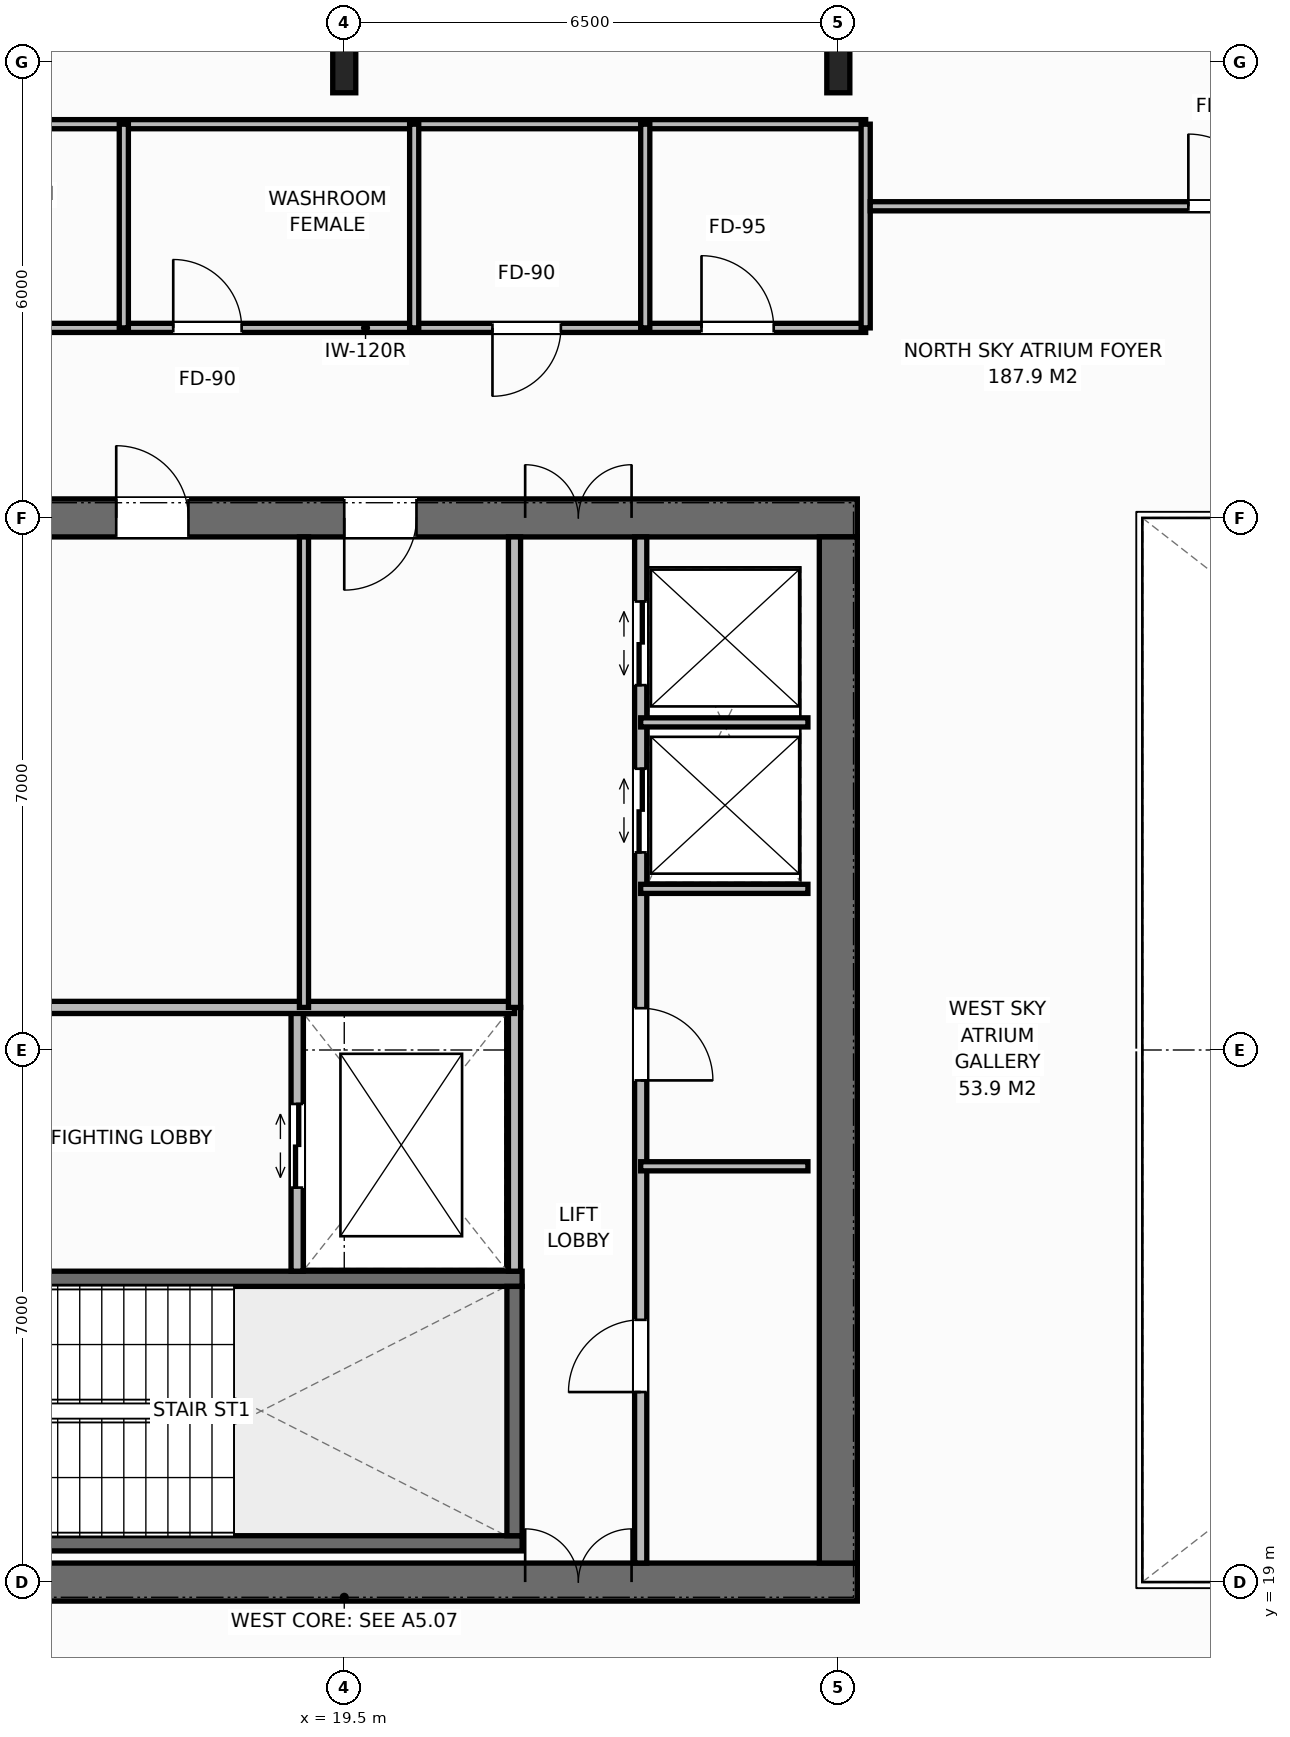
"""IFC4 building model, lengths in metres.
Left out: names, types, materials, properties, quantities, classifications, styles, units other than length and angle.
Written with IfcOpenShell. Run it as: python <this file> out.ifc"""

import sys

from ifc_helpers import new_model, si_unit, direction, frame, frame_2d, origin, origin_2d, place, context, subcontext, project, spatial, rectangle, i_section, extrude, element, fill, save


model = new_model("IFC4")
c1 = context("Model", 3, precision=1e-05, world=origin(), true_north=direction((0.0, 1.0)))
c2 = subcontext(c1, "Body", "Model", "MODEL_VIEW")
j1 = project(units=[si_unit("LENGTHUNIT", "METRE"), si_unit("PLANEANGLEUNIT", "RADIAN")], contexts=[c1])
p1 = place(None, origin())
s1 = spatial("IfcSite", under=j1, at=p1, CompositionType="ELEMENT")
p2 = place(p1, origin())
s2 = spatial("IfcBuilding", under=s1, at=p2, CompositionType="ELEMENT")
p3 = place(p2, frame((0.0, 0.0, 255.6)))
s3 = spatial("IfcBuildingStorey", under=s2, at=p3, CompositionType="ELEMENT", Elevation=255.6)
p4 = place(p3, frame((12.75, 19.0, 0.0), z_axis=(0.0, 0.0, 1.0), x_axis=(1.0, 0.0, 0.0)))
e1 = element("IfcWall", 1, at=p4, inside=s3, PredefinedType="SHEAR", context=c2, shape_type="SweptSolid", body=[
    extrude(rectangle(XDim=13.5, YDim=0.5, at=frame_2d((6.75, 0.0))), origin(), (0.0, 0.0, 1.0), 3.8),
])
p5 = place(p4, frame((9.13, 0.0, 0.0)))
e2 = element("IfcOpeningElement", 2, at=p5, cuts=e1, PredefinedType="OPENING", context=c2, shape_type="SweptSolid", body=[
    extrude(rectangle(XDim=1.4, YDim=2.2, at=frame_2d((0.7, 1.1))), frame((0.0, 0.26, 0.0), z_axis=(0.0, -1.0, 0.0), x_axis=(1.0, 0.0, 0.0)), (0.0, 0.0, 1.0), 0.52),
])
p6 = place(p3, frame((12.75, 33.0, 0.0), z_axis=(0.0, 0.0, 1.0), x_axis=(1.0, 0.0, 0.0)))
e3 = element("IfcWall", 3, at=p6, inside=s3, PredefinedType="SHEAR", context=c2, shape_type="SweptSolid", body=[
    extrude(rectangle(XDim=13.5, YDim=0.5, at=frame_2d((6.75, 0.0))), origin(), (0.0, 0.0, 1.0), 3.8),
])
p7 = place(p6, frame((1.15, 0.0, 0.0)))
e4 = element("IfcOpeningElement", 4, at=p7, cuts=e3, PredefinedType="OPENING", context=c2, shape_type="SweptSolid", body=[
    extrude(rectangle(XDim=0.9, YDim=2.15, at=frame_2d((0.45, 1.075))), frame((0.0, 0.26, 0.0), z_axis=(0.0, -1.0, 0.0), x_axis=(1.0, 0.0, 0.0)), (0.0, 0.0, 1.0), 0.52),
])
p8 = place(p6, frame((3.75, 0.0, 0.0)))
e5 = element("IfcOpeningElement", 5, at=p8, cuts=e3, PredefinedType="OPENING", context=c2, shape_type="SweptSolid", body=[
    extrude(rectangle(XDim=0.95, YDim=2.15, at=frame_2d((0.475, 1.075))), frame((0.0, 0.26, 0.0), z_axis=(0.0, -1.0, 0.0), x_axis=(1.0, 0.0, 0.0)), (0.0, 0.0, 1.0), 0.52),
])
p9 = place(p6, frame((6.75, 0.0, 0.0)))
e6 = element("IfcOpeningElement", 6, at=p9, cuts=e3, PredefinedType="OPENING", context=c2, shape_type="SweptSolid", body=[
    extrude(rectangle(XDim=0.95, YDim=2.15, at=frame_2d((0.475, 1.075))), frame((0.0, 0.26, 0.0), z_axis=(0.0, -1.0, 0.0), x_axis=(1.0, 0.0, 0.0)), (0.0, 0.0, 1.0), 0.52),
])
p10 = place(p6, frame((9.13, 0.0, 0.0)))
e7 = element("IfcOpeningElement", 7, at=p10, cuts=e3, PredefinedType="OPENING", context=c2, shape_type="SweptSolid", body=[
    extrude(rectangle(XDim=1.4, YDim=2.2, at=frame_2d((0.7, 1.1))), frame((0.0, 0.26, 0.0), z_axis=(0.0, -1.0, 0.0), x_axis=(1.0, 0.0, 0.0)), (0.0, 0.0, 1.0), 0.52),
])
p11 = place(p3, frame((26.0, 19.25, 0.0), z_axis=(0.0, 0.0, 1.0), x_axis=(0.0, 1.0, 0.0)))
e8 = element("IfcWall", 8, at=p11, inside=s3, PredefinedType="SHEAR", context=c2, shape_type="SweptSolid", body=[
    extrude(rectangle(XDim=13.5, YDim=0.5, at=frame_2d((6.75, 0.0))), origin(), (0.0, 0.0, 1.0), 3.8),
])
p12 = place(p3, frame((13.41, 19.51, 0.0), z_axis=(0.0, 0.0, 1.0), x_axis=(1.0, 0.0, 0.0)))
e9 = element("IfcWall", 9, at=p12, inside=s3, PredefinedType="SHEAR", context=c2, shape_type="SweptSolid", body=[
    extrude(rectangle(XDim=8.43, YDim=0.2, at=frame_2d((4.215, 0.0))), origin(), (0.0, 0.0, 1.0), 3.8),
])
p13 = place(p3, frame((13.41, 22.99, 0.0), z_axis=(0.0, 0.0, 1.0), x_axis=(1.0, 0.0, 0.0)))
e10 = element("IfcWall", 10, at=p13, inside=s3, PredefinedType="SHEAR", context=c2, shape_type="SweptSolid", body=[
    extrude(rectangle(XDim=8.43, YDim=0.2, at=frame_2d((4.215, 0.0))), origin(), (0.0, 0.0, 1.0), 3.8),
])
p14 = place(p13, frame((0.45, 0.0, 0.0)))
e11 = element("IfcOpeningElement", 11, at=p14, cuts=e10, PredefinedType="OPENING", context=c2, shape_type="SweptSolid", body=[
    extrude(rectangle(XDim=1.0, YDim=2.15, at=frame_2d((0.5, 1.075))), frame((0.0, 0.11, 0.0), z_axis=(0.0, -1.0, 0.0), x_axis=(1.0, 0.0, 0.0)), (0.0, 0.0, 1.0), 0.22),
])
p15 = place(p3, frame((21.74, 19.61, 0.0), z_axis=(0.0, 0.0, 1.0), x_axis=(0.0, 1.0, 0.0)))
e12 = element("IfcWall", 12, at=p15, inside=s3, PredefinedType="SHEAR", context=c2, shape_type="SweptSolid", body=[
    extrude(rectangle(XDim=3.28, YDim=0.2, at=frame_2d((1.64, 0.0))), origin(), (0.0, 0.0, 1.0), 3.8),
])
for number, where, z_axis, x_axis in (
    (13, (19.5, 39.0, 0.0), (0.0, 0.0, 1.0), (1.0, 0.0, 0.0)),
    (14, (26.0, 39.0, 0.0), (0.0, 0.0, 1.0), (1.0, 0.0, 0.0)),
):
    element("IfcColumn", number, at=place(p3, frame(where, z_axis=z_axis, x_axis=x_axis)), inside=s3, PredefinedType="COLUMN", context=c2, shape_type="SweptSolid", body=[
        extrude(i_section(OverallWidth=0.303, OverallDepth=0.814, WebThickness=0.021, FlangeThickness=0.04, at=origin_2d()), origin(), (0.0, 0.0, 1.0), 3.8),
    ])
p16 = place(p3, frame((21.74, 23.09, 0.0), z_axis=(0.0, 0.0, 1.0), x_axis=(0.0, 1.0, 0.0)))
e15 = element("IfcWall", 15, at=p16, inside=s3, PredefinedType="STANDARD", context=c2, shape_type="SweptSolid", body=[
    extrude(rectangle(XDim=3.47, YDim=0.16, at=frame_2d((1.735, 0.0))), origin(), (0.0, 0.0, 1.0), 3.588),
])
p17 = place(p3, frame((18.88, 23.09, 0.0), z_axis=(0.0, 0.0, 1.0), x_axis=(0.0, 1.0, 0.0)))
e16 = element("IfcWall", 16, at=p17, inside=s3, PredefinedType="STANDARD", context=c2, shape_type="SweptSolid", body=[
    extrude(rectangle(XDim=3.47, YDim=0.16, at=frame_2d((1.735, 0.0))), origin(), (0.0, 0.0, 1.0), 3.588),
])
p18 = place(p17, frame((1.1, 0.0, 0.0)))
e17 = element("IfcOpeningElement", 17, at=p18, cuts=e16, PredefinedType="OPENING", context=c2, shape_type="SweptSolid", body=[
    extrude(rectangle(XDim=1.1, YDim=2.2, at=frame_2d((0.55, 1.1))), frame((0.0, 0.09, 0.0), z_axis=(0.0, -1.0, 0.0), x_axis=(1.0, 0.0, 0.0)), (0.0, 0.0, 1.0), 0.18),
])
p19 = place(p3, frame((13.4, 26.56, 0.0), z_axis=(0.0, 0.0, 1.0), x_axis=(1.0, 0.0, 0.0)))
e18 = element("IfcWall", 18, at=p19, inside=s3, PredefinedType="STANDARD", context=c2, shape_type="SweptSolid", body=[
    extrude(rectangle(XDim=8.34, YDim=0.16, at=frame_2d((4.17, 0.0))), origin(), (0.0, 0.0, 1.0), 3.588),
])
p20 = place(p3, frame((18.97, 26.56, 0.0), z_axis=(0.0, 0.0, 1.0), x_axis=(0.0, 1.0, 0.0)))
e19 = element("IfcWall", 19, at=p20, inside=s3, PredefinedType="PARTITIONING", context=c2, shape_type="SweptSolid", body=[
    extrude(rectangle(XDim=6.19, YDim=0.12, at=frame_2d((3.095, 0.0))), origin(), (0.0, 0.0, 1.0), 3.588),
])
p21 = place(p3, frame((21.74, 26.56, 0.0), z_axis=(0.0, 0.0, 1.0), x_axis=(0.0, 1.0, 0.0)))
e20 = element("IfcWall", 20, at=p21, inside=s3, PredefinedType="STANDARD", context=c2, shape_type="SweptSolid", body=[
    extrude(rectangle(XDim=6.19, YDim=0.16, at=frame_2d((3.095, 0.0))), origin(), (0.0, 0.0, 1.0), 3.588),
])
p22 = place(p3, frame((23.4, 19.25, 0.0), z_axis=(0.0, 0.0, 1.0), x_axis=(0.0, 1.0, 0.0)))
e21 = element("IfcWall", 21, at=p22, inside=s3, PredefinedType="STANDARD", context=c2, shape_type="SweptSolid", body=[
    extrude(rectangle(XDim=13.5, YDim=0.16, at=frame_2d((6.75, 0.0))), origin(), (0.0, 0.0, 1.0), 3.588),
])
p23 = place(p22, frame((2.25, 0.0, 0.0)))
e22 = element("IfcOpeningElement", 22, at=p23, cuts=e21, PredefinedType="OPENING", context=c2, shape_type="SweptSolid", body=[
    extrude(rectangle(XDim=0.95, YDim=2.15, at=frame_2d((0.475, 1.075))), frame((0.0, 0.09, 0.0), z_axis=(0.0, -1.0, 0.0), x_axis=(1.0, 0.0, 0.0)), (0.0, 0.0, 1.0), 0.18),
])
p24 = place(p22, frame((6.35, 0.0, 0.0)))
e23 = element("IfcOpeningElement", 23, at=p24, cuts=e21, PredefinedType="OPENING", context=c2, shape_type="SweptSolid", body=[
    extrude(rectangle(XDim=0.95, YDim=2.15, at=frame_2d((0.475, 1.075))), frame((0.0, 0.09, 0.0), z_axis=(0.0, -1.0, 0.0), x_axis=(1.0, 0.0, 0.0)), (0.0, 0.0, 1.0), 0.18),
])
p25 = place(p22, frame((9.35, 0.0, 0.0)))
e24 = element("IfcOpeningElement", 24, at=p25, cuts=e21, PredefinedType="OPENING", context=c2, shape_type="SweptSolid", body=[
    extrude(rectangle(XDim=1.1, YDim=2.2, at=frame_2d((0.55, 1.1))), frame((0.0, 0.09, 0.0), z_axis=(0.0, -1.0, 0.0), x_axis=(1.0, 0.0, 0.0)), (0.0, 0.0, 1.0), 0.18),
])
p26 = place(p22, frame((11.55, 0.0, 0.0)))
e25 = element("IfcOpeningElement", 25, at=p26, cuts=e21, PredefinedType="OPENING", context=c2, shape_type="SweptSolid", body=[
    extrude(rectangle(XDim=1.1, YDim=2.2, at=frame_2d((0.55, 1.1))), frame((0.0, 0.09, 0.0), z_axis=(0.0, -1.0, 0.0), x_axis=(1.0, 0.0, 0.0)), (0.0, 0.0, 1.0), 0.18),
])
for number, where, z_axis, x_axis in (
    (26, (23.4, 24.47, 0.0), (0.0, 0.0, 1.0), (1.0, 0.0, 0.0)),
    (27, (23.4, 28.12, 0.0), (0.0, 0.0, 1.0), (1.0, 0.0, 0.0)),
    (28, (23.4, 30.31, 0.0), (0.0, 0.0, 1.0), (1.0, 0.0, 0.0)),
):
    element("IfcWall", number, at=place(p3, frame(where, z_axis=z_axis, x_axis=x_axis)), inside=s3, PredefinedType="PARTITIONING", context=c2, shape_type="SweptSolid", body=[
        extrude(rectangle(XDim=2.2, YDim=0.12, at=frame_2d((1.1, 0.0))), origin(), (0.0, 0.0, 1.0), 3.588),
    ])
p27 = place(p3, frame((13.2, 35.5, 0.0), z_axis=(0.0, 0.0, 1.0), x_axis=(1.0, 0.0, 0.0)))
e29 = element("IfcWall", 29, at=p27, inside=s3, PredefinedType="PARTITIONING", context=c2, shape_type="SweptSolid", body=[
    extrude(rectangle(XDim=13.16, YDim=0.12, at=frame_2d((6.58, 0.0))), origin(), (0.0, 0.0, 1.0), 3.588),
])
p28 = place(p27, frame((1.35, 0.0, 0.0)))
e30 = element("IfcOpeningElement", 30, at=p28, cuts=e29, PredefinedType="OPENING", context=c2, shape_type="SweptSolid", body=[
    extrude(rectangle(XDim=0.9, YDim=2.15, at=frame_2d((0.45, 1.075))), frame((0.0, 0.07, 0.0), z_axis=(0.0, -1.0, 0.0), x_axis=(1.0, 0.0, 0.0)), (0.0, 0.0, 1.0), 0.14),
])
p29 = place(p27, frame((4.05, 0.0, 0.0)))
e31 = element("IfcOpeningElement", 31, at=p29, cuts=e29, PredefinedType="OPENING", context=c2, shape_type="SweptSolid", body=[
    extrude(rectangle(XDim=0.9, YDim=2.15, at=frame_2d((0.45, 1.075))), frame((0.0, 0.07, 0.0), z_axis=(0.0, -1.0, 0.0), x_axis=(1.0, 0.0, 0.0)), (0.0, 0.0, 1.0), 0.14),
])
p30 = place(p27, frame((8.25, 0.0, 0.0)))
e32 = element("IfcOpeningElement", 32, at=p30, cuts=e29, PredefinedType="OPENING", context=c2, shape_type="SweptSolid", body=[
    extrude(rectangle(XDim=0.9, YDim=2.15, at=frame_2d((0.45, 1.075))), frame((0.0, 0.07, 0.0), z_axis=(0.0, -1.0, 0.0), x_axis=(1.0, 0.0, 0.0)), (0.0, 0.0, 1.0), 0.14),
])
p31 = place(p27, frame((11.0, 0.0, 0.0)))
e33 = element("IfcOpeningElement", 33, at=p31, cuts=e29, PredefinedType="OPENING", context=c2, shape_type="SweptSolid", body=[
    extrude(rectangle(XDim=0.95, YDim=2.15, at=frame_2d((0.475, 1.075))), frame((0.0, 0.07, 0.0), z_axis=(0.0, -1.0, 0.0), x_axis=(1.0, 0.0, 0.0)), (0.0, 0.0, 1.0), 0.14),
])
p32 = place(p3, frame((13.2, 38.18, 0.0), z_axis=(0.0, 0.0, 1.0), x_axis=(1.0, 0.0, 0.0)))
e34 = element("IfcWall", 34, at=p32, inside=s3, PredefinedType="PARTITIONING", context=c2, shape_type="SweptSolid", body=[
    extrude(rectangle(XDim=13.16, YDim=0.12, at=frame_2d((6.58, 0.0))), origin(), (0.0, 0.0, 1.0), 3.588),
])
for number, where, z_axis, x_axis in (
    (35, (16.6, 35.5, 0.0), (0.0, 0.0, 1.0), (0.0, 1.0, 0.0)),
    (36, (20.42, 35.5, 0.0), (0.0, 0.0, 1.0), (0.0, 1.0, 0.0)),
    (37, (23.46, 35.5, 0.0), (0.0, 0.0, 1.0), (0.0, 1.0, 0.0)),
    (38, (26.36, 35.5, 0.0), (0.0, 0.0, 1.0), (0.0, 1.0, 0.0)),
):
    element("IfcWall", number, at=place(p3, frame(where, z_axis=z_axis, x_axis=x_axis)), inside=s3, PredefinedType="PARTITIONING", context=c2, shape_type="SweptSolid", body=[
        extrude(rectangle(XDim=2.68, YDim=0.12, at=frame_2d((1.34, 0.0))), origin(), (0.0, 0.0, 1.0), 3.588),
    ])
p33 = place(p3, frame((26.42, 37.1, 0.0), z_axis=(0.0, 0.0, 1.0), x_axis=(1.0, 0.0, 0.0)))
e39 = element("IfcWall", 39, at=p33, inside=s3, PredefinedType="PARTITIONING", context=c2, shape_type="SweptSolid", body=[
    extrude(rectangle(XDim=9.32, YDim=0.12, at=frame_2d((4.66, 0.0))), origin(), (0.0, 0.0, 1.0), 3.588),
])
p34 = place(p33, frame((4.185, 0.0, 0.0)))
e40 = element("IfcOpeningElement", 40, at=p34, cuts=e39, PredefinedType="OPENING", context=c2, shape_type="SweptSolid", body=[
    extrude(rectangle(XDim=0.95, YDim=2.15, at=frame_2d((0.475, 1.075))), frame((0.0, 0.07, 0.0), z_axis=(0.0, -1.0, 0.0), x_axis=(1.0, 0.0, 0.0)), (0.0, 0.0, 1.0), 0.14),
])
p35 = place(p18, origin())
e41 = element("IfcDoor", 41, at=p35, inside=s3, OperationType="DOUBLE_DOOR_SLIDING", PredefinedType="DOOR", context=c2, shape_type="SweptSolid", body=[
    extrude(rectangle(XDim=1.1, YDim=2.2, at=frame_2d((0.55, 1.1))), frame((0.0, 0.025, 0.0), z_axis=(0.0, -1.0, 0.0), x_axis=(1.0, 0.0, 0.0)), (0.0, 0.0, 1.0), 0.05),
])
fill(e17, e41)
p36 = place(p8, origin())
e42 = element("IfcDoor", 42, at=p36, inside=s3, OperationType="SINGLE_SWING_LEFT", PredefinedType="DOOR", context=c2, shape_type="SweptSolid", body=[
    extrude(rectangle(XDim=0.95, YDim=2.15, at=frame_2d((0.475, 1.075))), frame((0.0, -0.025, 0.0), z_axis=(0.0, -1.0, 0.0), x_axis=(1.0, 0.0, 0.0)), (0.0, 0.0, 1.0), 0.05),
])
fill(e5, e42)
p37 = place(p9, origin())
e43 = element("IfcDoor", 43, at=p37, inside=s3, OperationType="SINGLE_SWING_RIGHT", PredefinedType="DOOR", context=c2, shape_type="SweptSolid", body=[
    extrude(rectangle(XDim=0.95, YDim=2.15, at=frame_2d((0.475, 1.075))), frame((0.0, -0.025, 0.0), z_axis=(0.0, -1.0, 0.0), x_axis=(1.0, 0.0, 0.0)), (0.0, 0.0, 1.0), 0.05),
])
fill(e6, e43)
p38 = place(p5, origin())
e44 = element("IfcDoor", 44, at=p38, inside=s3, OperationType="DOUBLE_DOOR_SINGLE_SWING", PredefinedType="DOOR", context=c2, shape_type="SweptSolid", body=[
    extrude(rectangle(XDim=1.4, YDim=2.2, at=frame_2d((0.7, 1.1))), frame((0.0, 0.075, 0.0), z_axis=(0.0, -1.0, 0.0), x_axis=(1.0, 0.0, 0.0)), (0.0, 0.0, 1.0), 0.05),
])
fill(e2, e44)
p39 = place(p10, origin())
e45 = element("IfcDoor", 45, at=p39, inside=s3, OperationType="DOUBLE_DOOR_SINGLE_SWING", PredefinedType="DOOR", context=c2, shape_type="SweptSolid", body=[
    extrude(rectangle(XDim=1.4, YDim=2.2, at=frame_2d((0.7, 1.1))), frame((0.0, -0.025, 0.0), z_axis=(0.0, -1.0, 0.0), x_axis=(1.0, 0.0, 0.0)), (0.0, 0.0, 1.0), 0.05),
])
fill(e7, e45)
p40 = place(p23, origin())
e46 = element("IfcDoor", 46, at=p40, inside=s3, OperationType="SINGLE_SWING_LEFT", PredefinedType="DOOR", context=c2, shape_type="SweptSolid", body=[
    extrude(rectangle(XDim=0.95, YDim=2.15, at=frame_2d((0.475, 1.075))), frame((0.0, 0.025, 0.0), z_axis=(0.0, -1.0, 0.0), x_axis=(1.0, 0.0, 0.0)), (0.0, 0.0, 1.0), 0.05),
])
fill(e22, e46)
p41 = place(p24, origin())
e47 = element("IfcDoor", 47, at=p41, inside=s3, OperationType="SINGLE_SWING_RIGHT", PredefinedType="DOOR", context=c2, shape_type="SweptSolid", body=[
    extrude(rectangle(XDim=0.95, YDim=2.15, at=frame_2d((0.475, 1.075))), frame((0.0, 0.025, 0.0), z_axis=(0.0, -1.0, 0.0), x_axis=(1.0, 0.0, 0.0)), (0.0, 0.0, 1.0), 0.05),
])
fill(e23, e47)
p42 = place(p25, origin())
e48 = element("IfcDoor", 48, at=p42, inside=s3, OperationType="DOUBLE_DOOR_SLIDING", PredefinedType="DOOR", context=c2, shape_type="SweptSolid", body=[
    extrude(rectangle(XDim=1.1, YDim=2.2, at=frame_2d((0.55, 1.1))), frame((0.0, 0.025, 0.0), z_axis=(0.0, -1.0, 0.0), x_axis=(1.0, 0.0, 0.0)), (0.0, 0.0, 1.0), 0.05),
])
fill(e24, e48)
p43 = place(p26, origin())
e49 = element("IfcDoor", 49, at=p43, inside=s3, OperationType="DOUBLE_DOOR_SLIDING", PredefinedType="DOOR", context=c2, shape_type="SweptSolid", body=[
    extrude(rectangle(XDim=1.1, YDim=2.2, at=frame_2d((0.55, 1.1))), frame((0.0, 0.025, 0.0), z_axis=(0.0, -1.0, 0.0), x_axis=(1.0, 0.0, 0.0)), (0.0, 0.0, 1.0), 0.05),
])
fill(e25, e49)
p44 = place(p29, origin())
e50 = element("IfcDoor", 50, at=p44, inside=s3, OperationType="SINGLE_SWING_LEFT", PredefinedType="DOOR", context=c2, shape_type="SweptSolid", body=[
    extrude(rectangle(XDim=0.9, YDim=2.15, at=frame_2d((0.45, 1.075))), frame((0.0, 0.025, 0.0), z_axis=(0.0, -1.0, 0.0), x_axis=(1.0, 0.0, 0.0)), (0.0, 0.0, 1.0), 0.05),
])
fill(e31, e50)
p45 = place(p30, origin())
e51 = element("IfcDoor", 51, at=p45, inside=s3, OperationType="SINGLE_SWING_RIGHT", PredefinedType="DOOR", context=c2, shape_type="SweptSolid", body=[
    extrude(rectangle(XDim=0.9, YDim=2.15, at=frame_2d((0.45, 1.075))), frame((0.0, 0.025, 0.0), z_axis=(0.0, -1.0, 0.0), x_axis=(1.0, 0.0, 0.0)), (0.0, 0.0, 1.0), 0.05),
])
fill(e32, e51)
p46 = place(p31, origin())
e52 = element("IfcDoor", 52, at=p46, inside=s3, OperationType="SINGLE_SWING_LEFT", PredefinedType="DOOR", context=c2, shape_type="SweptSolid", body=[
    extrude(rectangle(XDim=0.95, YDim=2.15, at=frame_2d((0.475, 1.075))), frame((0.0, 0.025, 0.0), z_axis=(0.0, -1.0, 0.0), x_axis=(1.0, 0.0, 0.0)), (0.0, 0.0, 1.0), 0.05),
])
fill(e33, e52)
p47 = place(p34, origin())
e53 = element("IfcDoor", 53, at=p47, inside=s3, OperationType="SINGLE_SWING_LEFT", PredefinedType="DOOR", context=c2, shape_type="SweptSolid", body=[
    extrude(rectangle(XDim=0.95, YDim=2.15, at=frame_2d((0.475, 1.075))), frame((0.0, 0.025, 0.0), z_axis=(0.0, -1.0, 0.0), x_axis=(1.0, 0.0, 0.0)), (0.0, 0.0, 1.0), 0.05),
])
fill(e40, e53)
save(model, sys.argv[1])
